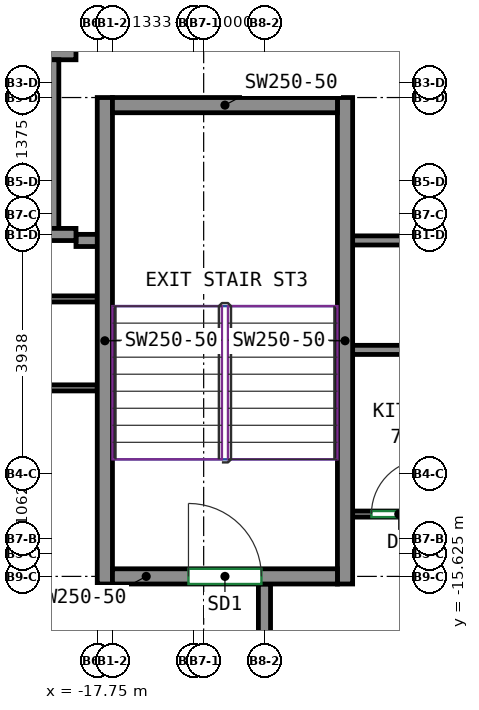
"""IFC4 building model, lengths in metres.
Left out: names, types, materials, properties, quantities, classifications, styles, units other than length and angle.
Written with IfcOpenShell. Run it as: python <this file> out.ifc"""

import sys

from ifc_helpers import new_model, si_unit, direction, frame, frame_2d, origin, place, context, subcontext, project, spatial, rectangle, extrude, source, transform, mapped, element, fill, save


model = new_model("IFC4")
c1 = context("Model", 3, precision=1e-05, world=origin(), true_north=direction((0.0, 1.0)))
c2 = subcontext(c1, "Body", "Model", "MODEL_VIEW")
j1 = project(units=[si_unit("LENGTHUNIT", "METRE"), si_unit("PLANEANGLEUNIT", "RADIAN")], contexts=[c1])
p1 = place(None, origin())
s1 = spatial("IfcSite", under=j1, at=p1, CompositionType="ELEMENT")
p2 = place(p1, origin())
s2 = spatial("IfcBuilding", under=s1, at=p2, CompositionType="ELEMENT")
p3 = place(p2, frame((0.0, 0.0, 301.8)))
s3 = spatial("IfcBuildingStorey", under=s2, at=p3, CompositionType="ELEMENT", Elevation=301.8)
m1 = source(origin(), c2, "Body", "SweptSolid", [
    extrude(rectangle(XDim=8.0, YDim=0.25, at=frame_2d((4.0, 0.0))), origin(), (0.0, 0.0, 1.0), 3.12),
])
for number, where, z_axis, x_axis in (
    (1, (-17.625, -15.75, 0.0), (0.0, 0.0, 1.0), (0.0, 1.0, 0.0)),
    (2, (-13.675, -15.75, 0.0), (0.0, 0.0, 1.0), (0.0, 1.0, 0.0)),
):
    element("IfcWall", number, at=place(p3, frame(where, z_axis=z_axis, x_axis=x_axis)), inside=s3, PredefinedType="SHEAR", context=c2, shape_type="MappedRepresentation", body=[
        mapped(m1, transform((0.0, 0.0, 0.0))),
    ])
m2 = source(origin(), c2, "Body", "SweptSolid", [
    extrude(rectangle(XDim=3.7, YDim=0.25, at=frame_2d((1.85, 0.0))), origin(), (0.0, 0.0, 1.0), 3.12),
])
p4 = place(p3, frame((-17.5, -15.625, 0.0), z_axis=(0.0, 0.0, 1.0), x_axis=(1.0, 0.0, 0.0)))
e3 = element("IfcWall", 3, at=p4, inside=s3, PredefinedType="SHEAR", context=c2, shape_type="MappedRepresentation", body=[
    mapped(m2, transform((0.0, 0.0, 0.0))),
])
p5 = place(p4, frame((1.25, 0.0, 0.0)))
e4 = element("IfcOpeningElement", 4, at=p5, cuts=e3, PredefinedType="OPENING", context=c2, shape_type="SweptSolid", body=[
    extrude(rectangle(XDim=1.2, YDim=2.1, at=frame_2d((0.6, 1.05))), frame((0.0, 0.135, 0.0), z_axis=(0.0, -1.0, 0.0), x_axis=(1.0, 0.0, 0.0)), (0.0, 0.0, 1.0), 0.27),
])
p6 = place(p3, frame((-17.5, -7.875, 0.0), z_axis=(0.0, 0.0, 1.0), x_axis=(1.0, 0.0, 0.0)))
e5 = element("IfcWall", 5, at=p6, inside=s3, PredefinedType="SHEAR", context=c2, shape_type="MappedRepresentation", body=[
    mapped(m2, transform((0.0, 0.0, 0.0))),
])
p7 = place(p3, frame((-13.55, -11.9, 0.0), z_axis=(0.0, 0.0, 1.0), x_axis=(1.0, 0.0, 0.0)))
e6 = element("IfcWall", 6, at=p7, inside=s3, PredefinedType="PARTITIONING", context=c2, shape_type="SweptSolid", body=[
    extrude(rectangle(XDim=31.3, YDim=0.15, at=frame_2d((15.65, 0.0))), origin(), (0.0, 0.0, 1.0), 3.12),
])
p8 = place(p7, frame((3.747, 0.0, 0.0)))
e7 = element("IfcOpeningElement", 7, at=p8, cuts=e6, PredefinedType="OPENING", context=c2, shape_type="SweptSolid", body=[
    extrude(rectangle(XDim=1.0, YDim=2.1, at=frame_2d((0.5, 1.05))), frame((0.0, 0.085, 0.0), z_axis=(0.0, -1.0, 0.0), x_axis=(1.0, 0.0, 0.0)), (0.0, 0.0, 1.0), 0.17),
])
p9 = place(p7, frame((22.835, 0.0, 0.0)))
e8 = element("IfcOpeningElement", 8, at=p9, cuts=e6, PredefinedType="OPENING", context=c2, shape_type="SweptSolid", body=[
    extrude(rectangle(XDim=1.0, YDim=2.1, at=frame_2d((0.5, 1.05))), frame((0.0, 0.085, 0.0), z_axis=(0.0, -1.0, 0.0), x_axis=(1.0, 0.0, 0.0)), (0.0, 0.0, 1.0), 0.17),
])
p10 = place(p3, frame((-13.55, -10.1, 0.0), z_axis=(0.0, 0.0, 1.0), x_axis=(1.0, 0.0, 0.0)))
e9 = element("IfcWall", 9, at=p10, inside=s3, PredefinedType="PARTITIONING", context=c2, shape_type="SweptSolid", body=[
    extrude(rectangle(XDim=30.65, YDim=0.15, at=frame_2d((15.325, 0.0))), origin(), (0.0, 0.0, 1.0), 3.12),
])
p11 = place(p10, frame((10.25, 0.0, 0.0)))
e10 = element("IfcOpeningElement", 10, at=p11, cuts=e9, PredefinedType="OPENING", context=c2, shape_type="SweptSolid", body=[
    extrude(rectangle(XDim=0.9, YDim=2.1, at=frame_2d((0.45, 1.05))), frame((0.0, 0.085, 0.0), z_axis=(0.0, -1.0, 0.0), x_axis=(1.0, 0.0, 0.0)), (0.0, 0.0, 1.0), 0.17),
])
p12 = place(p10, frame((22.153, 0.0, 0.0)))
e11 = element("IfcOpeningElement", 11, at=p12, cuts=e9, PredefinedType="OPENING", context=c2, shape_type="SweptSolid", body=[
    extrude(rectangle(XDim=0.9, YDim=2.1, at=frame_2d((0.45, 1.05))), frame((0.0, 0.085, 0.0), z_axis=(0.0, -1.0, 0.0), x_axis=(1.0, 0.0, 0.0)), (0.0, 0.0, 1.0), 0.17),
])
p13 = place(p3, frame((-17.75, -12.525, 0.0), z_axis=(0.0, 0.0, 1.0), x_axis=(-1.0, 0.0, 0.0)))
e12 = element("IfcWall", 12, at=p13, inside=s3, PredefinedType="PARTITIONING", context=c2, shape_type="SweptSolid", body=[
    extrude(rectangle(XDim=7.5, YDim=0.1, at=frame_2d((3.75, 0.0))), origin(), (0.0, 0.0, 1.0), 3.12),
])
p14 = place(p13, frame((5.995, 0.0, 0.0)))
e13 = element("IfcOpeningElement", 13, at=p14, cuts=e12, PredefinedType="OPENING", context=c2, shape_type="SweptSolid", body=[
    extrude(rectangle(XDim=1.0, YDim=2.1, at=frame_2d((0.5, 1.05))), frame((0.0, 0.06, 0.0), z_axis=(0.0, -1.0, 0.0), x_axis=(1.0, 0.0, 0.0)), (0.0, 0.0, 1.0), 0.12),
])
p15 = place(p3, frame((-15.0, -17.575, 0.0), z_axis=(0.0, 0.0, 1.0), x_axis=(0.0, 1.0, 0.0)))
e14 = element("IfcWall", 14, at=p15, inside=s3, PredefinedType="PARTITIONING", context=c2, shape_type="SweptSolid", body=[
    extrude(rectangle(XDim=1.825, YDim=0.2, at=frame_2d((0.913, 0.0))), origin(), (0.0, 0.0, 1.0), 3.12),
])
p16 = place(p3, frame((-17.75, -11.062, 0.0), z_axis=(0.0, 0.0, 1.0), x_axis=(-1.0, 0.0, 0.0)))
e15 = element("IfcWall", 15, at=p16, inside=s3, PredefinedType="PARTITIONING", context=c2, shape_type="SweptSolid", body=[
    extrude(rectangle(XDim=7.5, YDim=0.1, at=frame_2d((3.75, 0.0))), origin(), (0.0, 0.0, 1.0), 3.12),
])
p17 = place(p16, frame((1.115, 0.0, 0.0)))
e16 = element("IfcOpeningElement", 16, at=p17, cuts=e15, PredefinedType="OPENING", context=c2, shape_type="SweptSolid", body=[
    extrude(rectangle(XDim=0.9, YDim=2.1, at=frame_2d((0.45, 1.05))), frame((0.0, 0.06, 0.0), z_axis=(0.0, -1.0, 0.0), x_axis=(1.0, 0.0, 0.0)), (0.0, 0.0, 1.0), 0.12),
])
p18 = place(p3, frame((-17.7, -10.1, 0.0), z_axis=(0.0, 0.0, 1.0), x_axis=(-1.0, 0.0, 0.0)))
e17 = element("IfcWall", 17, at=p18, inside=s3, PredefinedType="PARTITIONING", context=c2, shape_type="SweptSolid", body=[
    extrude(rectangle(XDim=0.4, YDim=0.2, at=frame_2d((0.2, 0.0))), origin(), (0.0, 0.0, 1.0), 3.12),
])
p19 = place(p3, frame((-18.582, -7.029, 0.0), z_axis=(0.0, 0.0, 1.0), x_axis=(1.0, 0.0, 0.0)))
e18 = element("IfcWall", 18, at=p19, inside=s3, PredefinedType="PARTITIONING", context=c2, shape_type="SweptSolid", body=[
    extrude(rectangle(XDim=0.482, YDim=0.2, at=frame_2d((0.241, 0.0))), origin(), (0.0, 0.0, 1.0), 3.12),
])
p20 = place(p3, frame((-18.482, -9.902, 0.0), z_axis=(0.0, 0.0, 1.0), x_axis=(0.0, 1.0, 0.0)))
e19 = element("IfcWall", 19, at=p20, inside=s3, PredefinedType="PARTITIONING", context=c2, shape_type="SweptSolid", body=[
    extrude(rectangle(XDim=2.773, YDim=0.2, at=frame_2d((1.387, 0.0))), origin(), (0.0, 0.0, 1.0), 3.12),
])
p21 = place(p3, frame((-18.1, -10.002, 0.0), z_axis=(0.0, 0.0, 1.0), x_axis=(-1.0, 0.0, 0.0)))
e20 = element("IfcWall", 20, at=p21, inside=s3, PredefinedType="PARTITIONING", context=c2, shape_type="SweptSolid", body=[
    extrude(rectangle(XDim=0.482, YDim=0.2, at=frame_2d((0.241, 0.0))), origin(), (0.0, 0.0, 1.0), 3.12),
])
p22 = place(p3, frame((-13.55, -14.6, 0.0), z_axis=(0.0, 0.0, 1.0), x_axis=(1.0, 0.0, 0.0)))
e21 = element("IfcWall", 21, at=p22, inside=s3, PredefinedType="PARTITIONING", context=c2, shape_type="SweptSolid", body=[
    extrude(rectangle(XDim=31.3, YDim=0.1, at=frame_2d((15.65, 0.0))), origin(), (0.0, 0.0, 1.0), 3.12),
])
p23 = place(p22, frame((0.309, 0.0, 0.0)))
e22 = element("IfcOpeningElement", 22, at=p23, cuts=e21, PredefinedType="OPENING", context=c2, shape_type="SweptSolid", body=[
    extrude(rectangle(XDim=0.9, YDim=2.1, at=frame_2d((0.45, 1.05))), frame((0.0, 0.06, 0.0), z_axis=(0.0, -1.0, 0.0), x_axis=(1.0, 0.0, 0.0)), (0.0, 0.0, 1.0), 0.12),
])
p24 = place(p22, frame((4.103, 0.0, 0.0)))
e23 = element("IfcOpeningElement", 23, at=p24, cuts=e21, PredefinedType="OPENING", context=c2, shape_type="SweptSolid", body=[
    extrude(rectangle(XDim=1.0, YDim=2.1, at=frame_2d((0.5, 1.05))), frame((0.0, 0.06, 0.0), z_axis=(0.0, -1.0, 0.0), x_axis=(1.0, 0.0, 0.0)), (0.0, 0.0, 1.0), 0.12),
])
p25 = place(p22, frame((13.955, 0.0, 0.0)))
e24 = element("IfcOpeningElement", 24, at=p25, cuts=e21, PredefinedType="OPENING", context=c2, shape_type="SweptSolid", body=[
    extrude(rectangle(XDim=0.9, YDim=2.1, at=frame_2d((0.45, 1.05))), frame((0.0, 0.06, 0.0), z_axis=(0.0, -1.0, 0.0), x_axis=(1.0, 0.0, 0.0)), (0.0, 0.0, 1.0), 0.12),
])
p26 = place(p22, frame((17.453, 0.0, 0.0)))
e25 = element("IfcOpeningElement", 25, at=p26, cuts=e21, PredefinedType="OPENING", context=c2, shape_type="SweptSolid", body=[
    extrude(rectangle(XDim=1.0, YDim=2.1, at=frame_2d((0.5, 1.05))), frame((0.0, 0.06, 0.0), z_axis=(0.0, -1.0, 0.0), x_axis=(1.0, 0.0, 0.0)), (0.0, 0.0, 1.0), 0.12),
])
p27 = place(p22, frame((23.13, 0.0, 0.0)))
e26 = element("IfcOpeningElement", 26, at=p27, cuts=e21, PredefinedType="OPENING", context=c2, shape_type="SweptSolid", body=[
    extrude(rectangle(XDim=1.0, YDim=2.1, at=frame_2d((0.5, 1.05))), frame((0.0, 0.06, 0.0), z_axis=(0.0, -1.0, 0.0), x_axis=(1.0, 0.0, 0.0)), (0.0, 0.0, 1.0), 0.12),
])
p28 = place(p5, origin())
e27 = element("IfcDoor", 27, at=p28, inside=s3, OperationType="DOUBLE_DOOR_SINGLE_SWING", PredefinedType="DOOR", context=c2, shape_type="SweptSolid", body=[
    extrude(rectangle(XDim=1.2, YDim=2.1, at=frame_2d((0.6, 1.05))), frame((0.0, 0.025, 0.0), z_axis=(0.0, -1.0, 0.0), x_axis=(1.0, 0.0, 0.0)), (0.0, 0.0, 1.0), 0.05),
])
fill(e4, e27)
p29 = place(p23, origin())
e28 = element("IfcDoor", 28, at=p29, inside=s3, OperationType="SINGLE_SWING_RIGHT", PredefinedType="DOOR", context=c2, shape_type="SweptSolid", body=[
    extrude(rectangle(XDim=0.9, YDim=2.1, at=frame_2d((0.45, 1.05))), frame((0.0, 0.025, 0.0), z_axis=(0.0, -1.0, 0.0), x_axis=(1.0, 0.0, 0.0)), (0.0, 0.0, 1.0), 0.05),
])
fill(e22, e28)
save(model, sys.argv[1])
